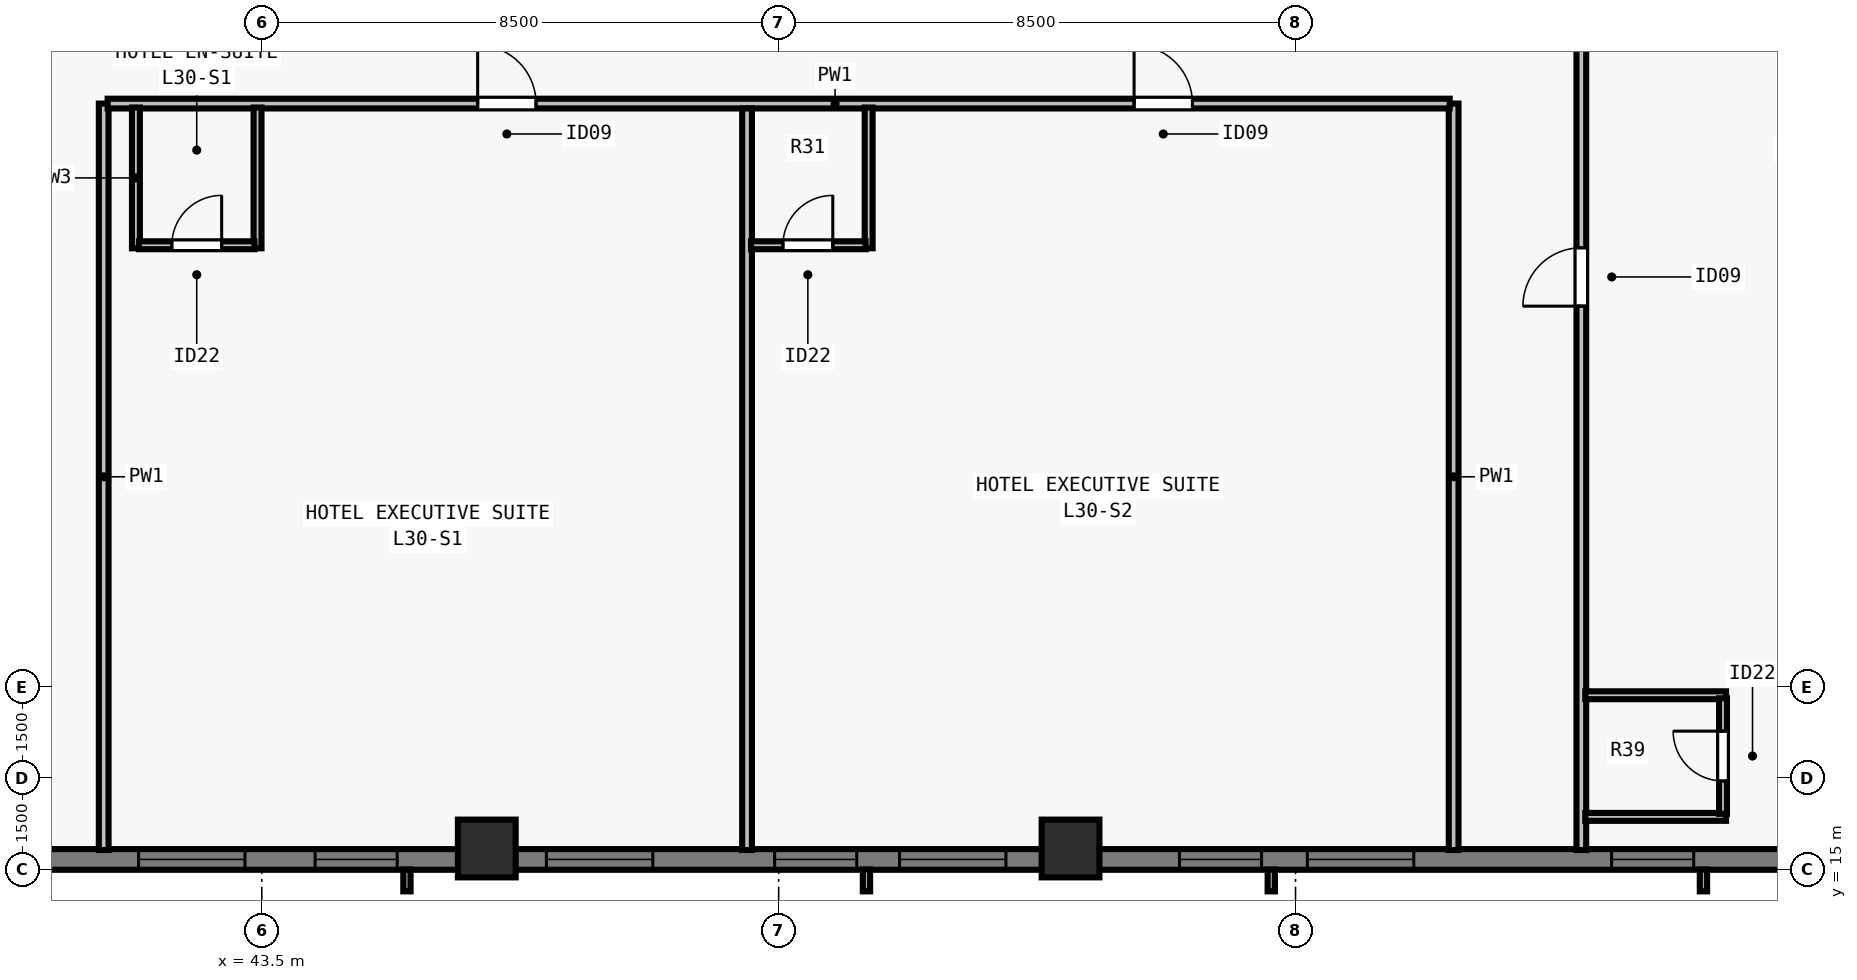
"""IFC4 building model, lengths in metres.
Left out: names, types, materials, properties, quantities, classifications, styles, units other than length and angle.
Written with IfcOpenShell. Run it as: python <this file> out.ifc"""

import sys

from ifc_helpers import new_model, si_unit, direction, frame, frame_2d, origin, origin_2d, place, context, subcontext, project, spatial, rectangle, extrude, element, fill, save


model = new_model("IFC4")
c1 = context("Model", 3, precision=1e-05, world=origin(), true_north=direction((0.0, 1.0)))
c2 = subcontext(c1, "Body", "Model", "MODEL_VIEW")
j1 = project(units=[si_unit("LENGTHUNIT", "METRE"), si_unit("PLANEANGLEUNIT", "RADIAN")], contexts=[c1])
p1 = place(None, origin())
s1 = spatial("IfcSite", under=j1, at=p1, CompositionType="ELEMENT")
p2 = place(p1, origin())
s2 = spatial("IfcBuilding", under=s1, at=p2, CompositionType="ELEMENT")
p3 = place(p2, frame((0.0, 0.0, 113.0)))
s3 = spatial("IfcBuildingStorey", under=s2, at=p3, CompositionType="ELEMENT", Elevation=113.0)
for number, where, z_axis, x_axis in (
    (1, (47.2, 15.35, 0.0), (0.0, 0.0, 1.0), (1.0, 0.0, 0.0)),
    (2, (56.8, 15.35, 0.0), (0.0, 0.0, 1.0), (1.0, 0.0, 0.0)),
):
    element("IfcColumn", number, at=place(p3, frame(where, z_axis=z_axis, x_axis=x_axis)), inside=s3, PredefinedType="COLUMN", context=c2, shape_type="SweptSolid", body=[
        extrude(rectangle(XDim=0.95, YDim=0.95, at=origin_2d()), origin(), (0.0, 0.0, 1.0), 3.5),
    ])
p4 = place(p3, frame((72.0, 15.17, 0.0), z_axis=(0.0, 0.0, 1.0), x_axis=(-1.0, 0.0, 0.0)))
e3 = element("IfcWall", 3, at=p4, inside=s3, PredefinedType="SOLIDWALL", context=c2, shape_type="SweptSolid", body=[
    extrude(rectangle(XDim=39.682, YDim=0.34, at=frame_2d((19.841, 0.0))), origin(), (0.0, 0.0, 1.0), 3.28),
])
p5 = place(p4, frame((4.952, 0.0, 0.8)))
e4 = element("IfcOpeningElement", 4, at=p5, cuts=e3, PredefinedType="OPENING", context=c2, shape_type="SweptSolid", body=[
    extrude(rectangle(XDim=1.35, YDim=1.66, at=frame_2d((0.675, 0.83))), frame((0.0, 0.18, 0.0), z_axis=(0.0, -1.0, 0.0), x_axis=(1.0, 0.0, 0.0)), (0.0, 0.0, 1.0), 0.36),
])
p6 = place(p4, frame((9.555, 0.0, 0.8)))
e5 = element("IfcOpeningElement", 5, at=p6, cuts=e3, PredefinedType="OPENING", context=c2, shape_type="SweptSolid", body=[
    extrude(rectangle(XDim=1.75, YDim=1.66, at=frame_2d((0.875, 0.83))), frame((0.0, 0.18, 0.0), z_axis=(0.0, -1.0, 0.0), x_axis=(1.0, 0.0, 0.0)), (0.0, 0.0, 1.0), 0.36),
])
p7 = place(p4, frame((12.059, 0.0, 0.8)))
e6 = element("IfcOpeningElement", 6, at=p7, cuts=e3, PredefinedType="OPENING", context=c2, shape_type="SweptSolid", body=[
    extrude(rectangle(XDim=1.35, YDim=1.66, at=frame_2d((0.675, 0.83))), frame((0.0, 0.18, 0.0), z_axis=(0.0, -1.0, 0.0), x_axis=(1.0, 0.0, 0.0)), (0.0, 0.0, 1.0), 0.36),
])
p8 = place(p4, frame((16.262, 0.0, 0.8)))
e7 = element("IfcOpeningElement", 7, at=p8, cuts=e3, PredefinedType="OPENING", context=c2, shape_type="SweptSolid", body=[
    extrude(rectangle(XDim=1.75, YDim=1.66, at=frame_2d((0.875, 0.83))), frame((0.0, 0.18, 0.0), z_axis=(0.0, -1.0, 0.0), x_axis=(1.0, 0.0, 0.0)), (0.0, 0.0, 1.0), 0.36),
])
p9 = place(p4, frame((18.716, 0.0, 0.8)))
e8 = element("IfcOpeningElement", 8, at=p9, cuts=e3, PredefinedType="OPENING", context=c2, shape_type="SweptSolid", body=[
    extrude(rectangle(XDim=1.35, YDim=1.66, at=frame_2d((0.675, 0.83))), frame((0.0, 0.18, 0.0), z_axis=(0.0, -1.0, 0.0), x_axis=(1.0, 0.0, 0.0)), (0.0, 0.0, 1.0), 0.36),
])
p10 = place(p4, frame((22.07, 0.0, 0.8)))
e9 = element("IfcOpeningElement", 9, at=p10, cuts=e3, PredefinedType="OPENING", context=c2, shape_type="SweptSolid", body=[
    extrude(rectangle(XDim=1.75, YDim=1.66, at=frame_2d((0.875, 0.83))), frame((0.0, 0.18, 0.0), z_axis=(0.0, -1.0, 0.0), x_axis=(1.0, 0.0, 0.0)), (0.0, 0.0, 1.0), 0.36),
])
p11 = place(p4, frame((26.273, 0.0, 0.8)))
e10 = element("IfcOpeningElement", 10, at=p11, cuts=e3, PredefinedType="OPENING", context=c2, shape_type="SweptSolid", body=[
    extrude(rectangle(XDim=1.35, YDim=1.66, at=frame_2d((0.675, 0.83))), frame((0.0, 0.18, 0.0), z_axis=(0.0, -1.0, 0.0), x_axis=(1.0, 0.0, 0.0)), (0.0, 0.0, 1.0), 0.36),
])
p12 = place(p4, frame((28.777, 0.0, 0.8)))
e11 = element("IfcOpeningElement", 11, at=p12, cuts=e3, PredefinedType="OPENING", context=c2, shape_type="SweptSolid", body=[
    extrude(rectangle(XDim=1.75, YDim=1.66, at=frame_2d((0.875, 0.83))), frame((0.0, 0.18, 0.0), z_axis=(0.0, -1.0, 0.0), x_axis=(1.0, 0.0, 0.0)), (0.0, 0.0, 1.0), 0.36),
])
p13 = place(p4, frame((33.83, 0.0, 0.8)))
e12 = element("IfcOpeningElement", 12, at=p13, cuts=e3, PredefinedType="OPENING", context=c2, shape_type="SweptSolid", body=[
    extrude(rectangle(XDim=1.35, YDim=1.66, at=frame_2d((0.675, 0.83))), frame((0.0, 0.18, 0.0), z_axis=(0.0, -1.0, 0.0), x_axis=(1.0, 0.0, 0.0)), (0.0, 0.0, 1.0), 0.36),
])
p14 = place(p3, frame((40.9, 15.325, 0.0), z_axis=(0.0, 0.0, 1.0), x_axis=(0.0, 1.0, 0.0)))
e13 = element("IfcWall", 13, at=p14, inside=s3, PredefinedType="PARTITIONING", context=c2, shape_type="SweptSolid", body=[
    extrude(rectangle(XDim=12.275, YDim=0.16, at=frame_2d((6.138, 0.0))), origin(), (0.0, 0.0, 1.0), 2.555),
])
p15 = place(p3, frame((65.2, 15.325, 0.0), z_axis=(0.0, 0.0, 1.0), x_axis=(0.0, 1.0, 0.0)))
e14 = element("IfcWall", 14, at=p15, inside=s3, PredefinedType="PARTITIONING", context=c2, shape_type="SweptSolid", body=[
    extrude(rectangle(XDim=47.35, YDim=0.16, at=frame_2d((23.675, 0.0))), origin(), (0.0, 0.0, 1.0), 2.555),
])
p16 = place(p15, frame((8.944, 0.0, 0.0)))
e15 = element("IfcOpeningElement", 15, at=p16, cuts=e14, PredefinedType="OPENING", context=c2, shape_type="SweptSolid", body=[
    extrude(rectangle(XDim=0.96, YDim=2.15, at=frame_2d((0.48, 1.075))), frame((0.0, 0.09, 0.0), z_axis=(0.0, -1.0, 0.0), x_axis=(1.0, 0.0, 0.0)), (0.0, 0.0, 1.0), 0.18),
])
p17 = place(p15, frame((24.322, 0.0, 0.0)))
e16 = element("IfcOpeningElement", 16, at=p17, cuts=e14, PredefinedType="OPENING", context=c2, shape_type="SweptSolid", body=[
    extrude(rectangle(XDim=0.96, YDim=2.15, at=frame_2d((0.48, 1.075))), frame((0.0, 0.09, 0.0), z_axis=(0.0, -1.0, 0.0), x_axis=(1.0, 0.0, 0.0)), (0.0, 0.0, 1.0), 0.18),
])
p18 = place(p15, frame((39.873, 0.0, 0.0)))
e17 = element("IfcOpeningElement", 17, at=p18, cuts=e14, PredefinedType="OPENING", context=c2, shape_type="SweptSolid", body=[
    extrude(rectangle(XDim=0.96, YDim=2.15, at=frame_2d((0.48, 1.075))), frame((0.0, 0.09, 0.0), z_axis=(0.0, -1.0, 0.0), x_axis=(1.0, 0.0, 0.0)), (0.0, 0.0, 1.0), 0.18),
])
p19 = place(p3, frame((63.1, 15.325, 0.0), z_axis=(0.0, 0.0, 1.0), x_axis=(0.0, 1.0, 0.0)))
e18 = element("IfcWall", 18, at=p19, inside=s3, PredefinedType="PARTITIONING", context=c2, shape_type="SweptSolid", body=[
    extrude(rectangle(XDim=12.275, YDim=0.16, at=frame_2d((6.138, 0.0))), origin(), (0.0, 0.0, 1.0), 2.555),
])
p20 = place(p3, frame((40.965, 27.6, 0.0), z_axis=(0.0, 0.0, 1.0), x_axis=(1.0, 0.0, 0.0)))
e19 = element("IfcWall", 19, at=p20, inside=s3, PredefinedType="PARTITIONING", context=c2, shape_type="SweptSolid", body=[
    extrude(rectangle(XDim=22.07, YDim=0.16, at=frame_2d((11.035, 0.0))), origin(), (0.0, 0.0, 1.0), 3.28),
])
p21 = place(p20, frame((6.085, 0.0, 0.0)))
e20 = element("IfcOpeningElement", 20, at=p21, cuts=e19, PredefinedType="OPENING", context=c2, shape_type="SweptSolid", body=[
    extrude(rectangle(XDim=0.96, YDim=2.15, at=frame_2d((0.48, 1.075))), frame((0.0, 0.09, 0.0), z_axis=(0.0, -1.0, 0.0), x_axis=(1.0, 0.0, 0.0)), (0.0, 0.0, 1.0), 0.18),
])
p22 = place(p20, frame((16.88, 0.0, 0.0)))
e21 = element("IfcOpeningElement", 21, at=p22, cuts=e19, PredefinedType="OPENING", context=c2, shape_type="SweptSolid", body=[
    extrude(rectangle(XDim=0.96, YDim=2.15, at=frame_2d((0.48, 1.075))), frame((0.0, 0.09, 0.0), z_axis=(0.0, -1.0, 0.0), x_axis=(1.0, 0.0, 0.0)), (0.0, 0.0, 1.0), 0.18),
])
for number, where, z_axis, x_axis in (
    (22, (41.43, 25.22, 0.0), (0.0, 0.0, 1.0), (0.0, 1.0, 0.0)),
    (23, (43.43, 25.22, 0.0), (0.0, 0.0, 1.0), (0.0, 1.0, 0.0)),
):
    element("IfcWall", number, at=place(p3, frame(where, z_axis=z_axis, x_axis=x_axis)), inside=s3, PredefinedType="PLUMBINGWALL", context=c2, shape_type="SweptSolid", body=[
        extrude(rectangle(XDim=2.315, YDim=0.13, at=frame_2d((1.157, 0.0))), origin(), (0.0, 0.0, 1.0), 3.28),
    ])
p23 = place(p3, frame((41.48, 25.27, 0.0), z_axis=(0.0, 0.0, 1.0), x_axis=(1.0, 0.0, 0.0)))
e24 = element("IfcWall", 24, at=p23, inside=s3, PredefinedType="PLUMBINGWALL", context=c2, shape_type="SweptSolid", body=[
    extrude(rectangle(XDim=1.9, YDim=0.13, at=frame_2d((0.95, 0.0))), origin(), (0.0, 0.0, 1.0), 3.28),
])
p24 = place(p23, frame((0.54, 0.0, 0.0)))
e25 = element("IfcOpeningElement", 25, at=p24, cuts=e24, PredefinedType="OPENING", context=c2, shape_type="SweptSolid", body=[
    extrude(rectangle(XDim=0.82, YDim=2.1, at=frame_2d((0.41, 1.05))), frame((0.0, 0.075, 0.0), z_axis=(0.0, -1.0, 0.0), x_axis=(1.0, 0.0, 0.0)), (0.0, 0.0, 1.0), 0.15),
])
p25 = place(p3, frame((51.48, 15.325, 0.0), z_axis=(0.0, 0.0, 1.0), x_axis=(0.0, 1.0, 0.0)))
e26 = element("IfcWall", 26, at=p25, inside=s3, PredefinedType="PARTITIONING", context=c2, shape_type="SweptSolid", body=[
    extrude(rectangle(XDim=12.195, YDim=0.16, at=frame_2d((6.098, 0.0))), origin(), (0.0, 0.0, 1.0), 2.896),
])
p26 = place(p3, frame((53.48, 25.22, 0.0), z_axis=(0.0, 0.0, 1.0), x_axis=(0.0, 1.0, 0.0)))
e27 = element("IfcWall", 27, at=p26, inside=s3, PredefinedType="PLUMBINGWALL", context=c2, shape_type="SweptSolid", body=[
    extrude(rectangle(XDim=2.315, YDim=0.13, at=frame_2d((1.157, 0.0))), origin(), (0.0, 0.0, 1.0), 2.896),
])
p27 = place(p3, frame((51.545, 25.27, 0.0), z_axis=(0.0, 0.0, 1.0), x_axis=(1.0, 0.0, 0.0)))
e28 = element("IfcWall", 28, at=p27, inside=s3, PredefinedType="PLUMBINGWALL", context=c2, shape_type="SweptSolid", body=[
    extrude(rectangle(XDim=1.885, YDim=0.13, at=frame_2d((0.942, 0.0))), origin(), (0.0, 0.0, 1.0), 3.28),
])
p28 = place(p27, frame((0.525, 0.0, 0.0)))
e29 = element("IfcOpeningElement", 29, at=p28, cuts=e28, PredefinedType="OPENING", context=c2, shape_type="SweptSolid", body=[
    extrude(rectangle(XDim=0.82, YDim=2.1, at=frame_2d((0.41, 1.05))), frame((0.0, 0.075, 0.0), z_axis=(0.0, -1.0, 0.0), x_axis=(1.0, 0.0, 0.0)), (0.0, 0.0, 1.0), 0.15),
])
for number, where, z_axis, x_axis in (
    (30, (65.265, 15.87, 0.0), (0.0, 0.0, 1.0), (1.0, 0.0, 0.0)),
    (31, (65.265, 17.87, 0.0), (0.0, 0.0, 1.0), (1.0, 0.0, 0.0)),
):
    element("IfcWall", number, at=place(p3, frame(where, z_axis=z_axis, x_axis=x_axis)), inside=s3, PredefinedType="PLUMBINGWALL", context=c2, shape_type="SweptSolid", body=[
        extrude(rectangle(XDim=2.315, YDim=0.13, at=frame_2d((1.158, 0.0))), origin(), (0.0, 0.0, 1.0), 3.28),
    ])
p29 = place(p3, frame((67.53, 15.92, 0.0), z_axis=(0.0, 0.0, 1.0), x_axis=(0.0, 1.0, 0.0)))
e32 = element("IfcWall", 32, at=p29, inside=s3, PredefinedType="PLUMBINGWALL", context=c2, shape_type="SweptSolid", body=[
    extrude(rectangle(XDim=1.9, YDim=0.13, at=frame_2d((0.95, 0.0))), origin(), (0.0, 0.0, 1.0), 3.28),
])
p30 = place(p29, frame((0.54, 0.0, 0.0)))
e33 = element("IfcOpeningElement", 33, at=p30, cuts=e32, PredefinedType="OPENING", context=c2, shape_type="SweptSolid", body=[
    extrude(rectangle(XDim=0.82, YDim=2.1, at=frame_2d((0.41, 1.05))), frame((0.0, 0.075, 0.0), z_axis=(0.0, -1.0, 0.0), x_axis=(1.0, 0.0, 0.0)), (0.0, 0.0, 1.0), 0.15),
])
p31 = place(p5, origin())
e34 = element("IfcWindow", 34, at=p31, inside=s3, PartitioningType="SINGLE_PANEL", PredefinedType="WINDOW", context=c2, shape_type="SweptSolid", body=[
    extrude(rectangle(XDim=1.35, YDim=1.66, at=frame_2d((0.675, 0.83))), frame((0.0, -0.05, 0.0), z_axis=(0.0, -1.0, 0.0), x_axis=(1.0, 0.0, 0.0)), (0.0, 0.0, 1.0), 0.06),
])
fill(e4, e34)
p32 = place(p6, origin())
e35 = element("IfcWindow", 35, at=p32, inside=s3, PartitioningType="SINGLE_PANEL", PredefinedType="WINDOW", context=c2, shape_type="SweptSolid", body=[
    extrude(rectangle(XDim=1.75, YDim=1.66, at=frame_2d((0.875, 0.83))), frame((0.0, -0.05, 0.0), z_axis=(0.0, -1.0, 0.0), x_axis=(1.0, 0.0, 0.0)), (0.0, 0.0, 1.0), 0.06),
])
fill(e5, e35)
p33 = place(p7, origin())
e36 = element("IfcWindow", 36, at=p33, inside=s3, PartitioningType="SINGLE_PANEL", PredefinedType="WINDOW", context=c2, shape_type="SweptSolid", body=[
    extrude(rectangle(XDim=1.35, YDim=1.66, at=frame_2d((0.675, 0.83))), frame((0.0, -0.05, 0.0), z_axis=(0.0, -1.0, 0.0), x_axis=(1.0, 0.0, 0.0)), (0.0, 0.0, 1.0), 0.06),
])
fill(e6, e36)
p34 = place(p8, origin())
e37 = element("IfcWindow", 37, at=p34, inside=s3, PartitioningType="SINGLE_PANEL", PredefinedType="WINDOW", context=c2, shape_type="SweptSolid", body=[
    extrude(rectangle(XDim=1.75, YDim=1.66, at=frame_2d((0.875, 0.83))), frame((0.0, -0.05, 0.0), z_axis=(0.0, -1.0, 0.0), x_axis=(1.0, 0.0, 0.0)), (0.0, 0.0, 1.0), 0.06),
])
fill(e7, e37)
p35 = place(p9, origin())
e38 = element("IfcWindow", 38, at=p35, inside=s3, PartitioningType="SINGLE_PANEL", PredefinedType="WINDOW", context=c2, shape_type="SweptSolid", body=[
    extrude(rectangle(XDim=1.35, YDim=1.66, at=frame_2d((0.675, 0.83))), frame((0.0, -0.05, 0.0), z_axis=(0.0, -1.0, 0.0), x_axis=(1.0, 0.0, 0.0)), (0.0, 0.0, 1.0), 0.06),
])
fill(e8, e38)
p36 = place(p10, origin())
e39 = element("IfcWindow", 39, at=p36, inside=s3, PartitioningType="SINGLE_PANEL", PredefinedType="WINDOW", context=c2, shape_type="SweptSolid", body=[
    extrude(rectangle(XDim=1.75, YDim=1.66, at=frame_2d((0.875, 0.83))), frame((0.0, -0.05, 0.0), z_axis=(0.0, -1.0, 0.0), x_axis=(1.0, 0.0, 0.0)), (0.0, 0.0, 1.0), 0.06),
])
fill(e9, e39)
p37 = place(p11, origin())
e40 = element("IfcWindow", 40, at=p37, inside=s3, PartitioningType="SINGLE_PANEL", PredefinedType="WINDOW", context=c2, shape_type="SweptSolid", body=[
    extrude(rectangle(XDim=1.35, YDim=1.66, at=frame_2d((0.675, 0.83))), frame((0.0, -0.05, 0.0), z_axis=(0.0, -1.0, 0.0), x_axis=(1.0, 0.0, 0.0)), (0.0, 0.0, 1.0), 0.06),
])
fill(e10, e40)
p38 = place(p12, origin())
e41 = element("IfcWindow", 41, at=p38, inside=s3, PartitioningType="SINGLE_PANEL", PredefinedType="WINDOW", context=c2, shape_type="SweptSolid", body=[
    extrude(rectangle(XDim=1.75, YDim=1.66, at=frame_2d((0.875, 0.83))), frame((0.0, -0.05, 0.0), z_axis=(0.0, -1.0, 0.0), x_axis=(1.0, 0.0, 0.0)), (0.0, 0.0, 1.0), 0.06),
])
fill(e11, e41)
p39 = place(p24, origin())
e42 = element("IfcDoor", 42, at=p39, inside=s3, OperationType="SINGLE_SWING_RIGHT", PredefinedType="DOOR", context=c2, shape_type="SweptSolid", body=[
    extrude(rectangle(XDim=0.82, YDim=2.1, at=frame_2d((0.41, 1.05))), frame((0.0, 0.025, 0.0), z_axis=(0.0, -1.0, 0.0), x_axis=(1.0, 0.0, 0.0)), (0.0, 0.0, 1.0), 0.05),
])
fill(e25, e42)
p40 = place(p21, origin())
e43 = element("IfcDoor", 43, at=p40, inside=s3, OperationType="SINGLE_SWING_LEFT", PredefinedType="DOOR", context=c2, shape_type="SweptSolid", body=[
    extrude(rectangle(XDim=0.96, YDim=2.15, at=frame_2d((0.48, 1.075))), frame((0.0, 0.025, 0.0), z_axis=(0.0, -1.0, 0.0), x_axis=(1.0, 0.0, 0.0)), (0.0, 0.0, 1.0), 0.05),
])
fill(e20, e43)
p41 = place(p28, origin())
e44 = element("IfcDoor", 44, at=p41, inside=s3, OperationType="SINGLE_SWING_RIGHT", PredefinedType="DOOR", context=c2, shape_type="SweptSolid", body=[
    extrude(rectangle(XDim=0.82, YDim=2.1, at=frame_2d((0.41, 1.05))), frame((0.0, 0.025, 0.0), z_axis=(0.0, -1.0, 0.0), x_axis=(1.0, 0.0, 0.0)), (0.0, 0.0, 1.0), 0.05),
])
fill(e29, e44)
p42 = place(p22, origin())
e45 = element("IfcDoor", 45, at=p42, inside=s3, OperationType="SINGLE_SWING_LEFT", PredefinedType="DOOR", context=c2, shape_type="SweptSolid", body=[
    extrude(rectangle(XDim=0.96, YDim=2.15, at=frame_2d((0.48, 1.075))), frame((0.0, 0.025, 0.0), z_axis=(0.0, -1.0, 0.0), x_axis=(1.0, 0.0, 0.0)), (0.0, 0.0, 1.0), 0.05),
])
fill(e21, e45)
p43 = place(p30, origin())
e46 = element("IfcDoor", 46, at=p43, inside=s3, OperationType="SINGLE_SWING_RIGHT", PredefinedType="DOOR", context=c2, shape_type="SweptSolid", body=[
    extrude(rectangle(XDim=0.82, YDim=2.1, at=frame_2d((0.41, 1.05))), frame((0.0, 0.025, 0.0), z_axis=(0.0, -1.0, 0.0), x_axis=(1.0, 0.0, 0.0)), (0.0, 0.0, 1.0), 0.05),
])
fill(e33, e46)
p44 = place(p16, origin())
e47 = element("IfcDoor", 47, at=p44, inside=s3, OperationType="SINGLE_SWING_LEFT", PredefinedType="DOOR", context=c2, shape_type="SweptSolid", body=[
    extrude(rectangle(XDim=0.96, YDim=2.15, at=frame_2d((0.48, 1.075))), frame((0.0, 0.025, 0.0), z_axis=(0.0, -1.0, 0.0), x_axis=(1.0, 0.0, 0.0)), (0.0, 0.0, 1.0), 0.05),
])
fill(e15, e47)
save(model, sys.argv[1])
